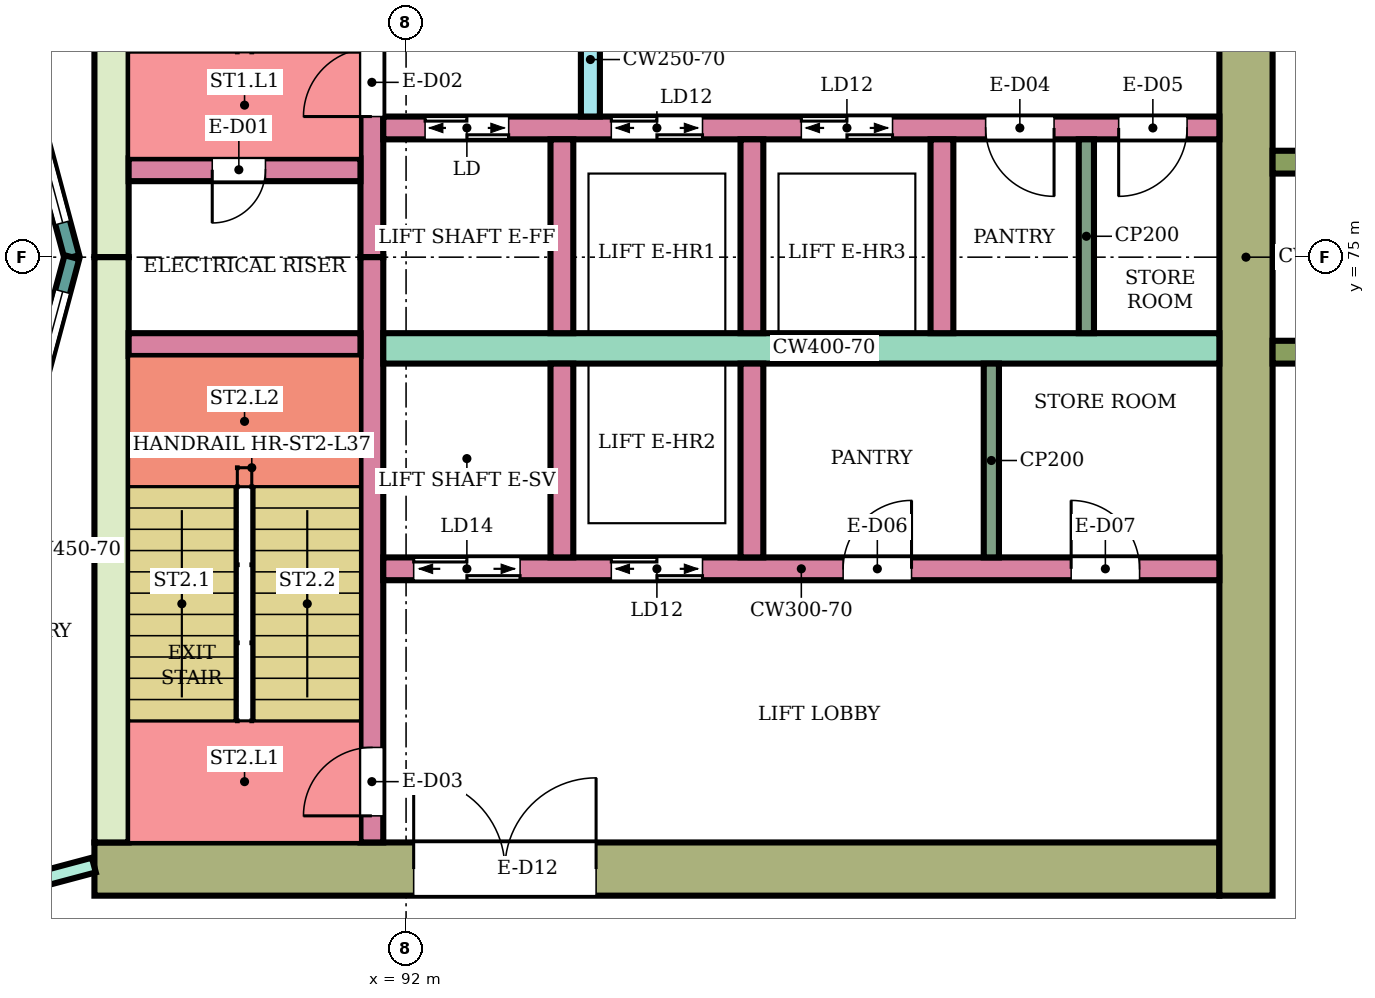
"""IFC4 building model, lengths in metres.
Left out: names, types, materials, properties, quantities, classifications, styles, units other than length and angle.
Written with IfcOpenShell. Run it as: python <this file> out.ifc"""

import sys

from ifc_helpers import new_model, si_unit, direction, frame, frame_2d, origin, place, context, subcontext, project, spatial, rectangle, extrude, element, fill, save


model = new_model("IFC4")
c1 = context("Model", 3, precision=1e-05, world=origin(), true_north=direction((0.0, 1.0)))
c2 = subcontext(c1, "Body", "Model", "MODEL_VIEW")
j1 = project(units=[si_unit("LENGTHUNIT", "METRE"), si_unit("PLANEANGLEUNIT", "RADIAN")], contexts=[c1])
p1 = place(None, origin())
s1 = spatial("IfcSite", under=j1, at=p1, CompositionType="ELEMENT")
p2 = place(p1, origin())
s2 = spatial("IfcBuilding", under=s1, at=p2, CompositionType="ELEMENT")
p3 = place(p2, frame((0.0, 0.0, 161.8)))
s3 = spatial("IfcBuildingStorey", under=s2, at=p3, CompositionType="ELEMENT", Elevation=161.8)
p4 = place(p3, frame((87.9, 66.95, 0.0), z_axis=(0.0, 0.0, 1.0), x_axis=(1.0, 0.0, 0.0)))
e1 = element("IfcWall", 1, at=p4, inside=s3, PredefinedType="SHEAR", context=c2, shape_type="SweptSolid", body=[
    extrude(rectangle(XDim=14.8, YDim=0.7, at=frame_2d((7.4, 0.0))), origin(), (0.0, 0.0, 1.0), 3.78),
])
p5 = place(p4, frame((4.2, 0.0, 0.0)))
e2 = element("IfcOpeningElement", 2, at=p5, cuts=e1, PredefinedType="OPENING", context=c2, shape_type="SweptSolid", body=[
    extrude(rectangle(XDim=2.4, YDim=2.4, at=frame_2d((1.2, 1.2))), frame((0.0, 0.36, 0.0), z_axis=(0.0, -1.0, 0.0), x_axis=(1.0, 0.0, 0.0)), (0.0, 0.0, 1.0), 0.72),
])
for number, where, z_axis, x_axis in (
    (3, (88.125, 75.0, 0.0), (0.0, 0.0, 1.0), (0.0, 1.0, 0.0)),
    (4, (88.125, 67.3, 0.0), (0.0, 0.0, 1.0), (0.0, 1.0, 0.0)),
):
    element("IfcWall", number, at=place(p3, frame(where, z_axis=z_axis, x_axis=x_axis)), inside=s3, PredefinedType="SHEAR", context=c2, shape_type="SweptSolid", body=[
        extrude(rectangle(XDim=7.7, YDim=0.45, at=frame_2d((3.85, 0.0))), origin(), (0.0, 0.0, 1.0), 3.78),
    ])
p6 = place(p3, frame((103.05, 66.6, 0.0), z_axis=(0.0, 0.0, 1.0), x_axis=(0.0, 1.0, 0.0)))
e5 = element("IfcWall", 5, at=p6, inside=s3, PredefinedType="SHEAR", context=c2, shape_type="SweptSolid", body=[
    extrude(rectangle(XDim=16.8, YDim=0.7, at=frame_2d((8.4, 0.0))), origin(), (0.0, 0.0, 1.0), 3.78),
])
p7 = place(p3, frame((91.55, 75.0, 0.0), z_axis=(0.0, 0.0, 1.0), x_axis=(0.0, 1.0, 0.0)))
e6 = element("IfcWall", 6, at=p7, inside=s3, PredefinedType="SHEAR", context=c2, shape_type="SweptSolid", body=[
    extrude(rectangle(XDim=7.7, YDim=0.3, at=frame_2d((3.85, 0.0))), origin(), (0.0, 0.0, 1.0), 3.78),
])
p8 = place(p7, frame((1.85, 0.0, 0.0)))
e7 = element("IfcOpeningElement", 7, at=p8, cuts=e6, PredefinedType="OPENING", context=c2, shape_type="SweptSolid", body=[
    extrude(rectangle(XDim=0.9, YDim=2.1, at=frame_2d((0.45, 1.05))), frame((0.0, 0.16, 0.0), z_axis=(0.0, -1.0, 0.0), x_axis=(1.0, 0.0, 0.0)), (0.0, 0.0, 1.0), 0.32),
])
p9 = place(p3, frame((91.55, 67.3, 0.0), z_axis=(0.0, 0.0, 1.0), x_axis=(0.0, 1.0, 0.0)))
e8 = element("IfcWall", 8, at=p9, inside=s3, PredefinedType="SHEAR", context=c2, shape_type="SweptSolid", body=[
    extrude(rectangle(XDim=7.7, YDim=0.3, at=frame_2d((3.85, 0.0))), origin(), (0.0, 0.0, 1.0), 3.78),
])
p10 = place(p9, frame((0.35, 0.0, 0.0)))
e9 = element("IfcOpeningElement", 9, at=p10, cuts=e8, PredefinedType="OPENING", context=c2, shape_type="SweptSolid", body=[
    extrude(rectangle(XDim=0.9, YDim=2.1, at=frame_2d((0.45, 1.05))), frame((0.0, 0.16, 0.0), z_axis=(0.0, -1.0, 0.0), x_axis=(1.0, 0.0, 0.0)), (0.0, 0.0, 1.0), 0.32),
])
p11 = place(p3, frame((88.35, 76.15, 0.0), z_axis=(0.0, 0.0, 1.0), x_axis=(1.0, 0.0, 0.0)))
e10 = element("IfcWall", 10, at=p11, inside=s3, PredefinedType="SHEAR", context=c2, shape_type="SweptSolid", body=[
    extrude(rectangle(XDim=3.05, YDim=0.3, at=frame_2d((1.525, 0.0))), origin(), (0.0, 0.0, 1.0), 3.78),
])
p12 = place(p11, frame((1.1, 0.0, 0.0)))
e11 = element("IfcOpeningElement", 11, at=p12, cuts=e10, PredefinedType="OPENING", context=c2, shape_type="SweptSolid", body=[
    extrude(rectangle(XDim=0.7, YDim=2.0, at=frame_2d((0.35, 1.0))), frame((0.0, 0.16, 0.0), z_axis=(0.0, -1.0, 0.0), x_axis=(1.0, 0.0, 0.0)), (0.0, 0.0, 1.0), 0.32),
])
p13 = place(p3, frame((88.35, 73.85, 0.0), z_axis=(0.0, 0.0, 1.0), x_axis=(1.0, 0.0, 0.0)))
e12 = element("IfcWall", 12, at=p13, inside=s3, PredefinedType="SHEAR", context=c2, shape_type="SweptSolid", body=[
    extrude(rectangle(XDim=3.05, YDim=0.3, at=frame_2d((1.525, 0.0))), origin(), (0.0, 0.0, 1.0), 3.78),
])
p14 = place(p3, frame((91.7, 76.7, 0.0), z_axis=(0.0, 0.0, 1.0), x_axis=(1.0, 0.0, 0.0)))
e13 = element("IfcWall", 13, at=p14, inside=s3, PredefinedType="SHEAR", context=c2, shape_type="SweptSolid", body=[
    extrude(rectangle(XDim=11.0, YDim=0.3, at=frame_2d((5.5, 0.0))), origin(), (0.0, 0.0, 1.0), 3.78),
])
p15 = place(p14, frame((0.55, 0.0, 0.0)))
e14 = element("IfcOpeningElement", 14, at=p15, cuts=e13, PredefinedType="OPENING", context=c2, shape_type="SweptSolid", body=[
    extrude(rectangle(XDim=1.1, YDim=2.1, at=frame_2d((0.55, 1.05))), frame((0.0, 0.16, 0.0), z_axis=(0.0, -1.0, 0.0), x_axis=(1.0, 0.0, 0.0)), (0.0, 0.0, 1.0), 0.32),
])
p16 = place(p14, frame((3.0, 0.0, 0.0)))
e15 = element("IfcOpeningElement", 15, at=p16, cuts=e13, PredefinedType="OPENING", context=c2, shape_type="SweptSolid", body=[
    extrude(rectangle(XDim=1.2, YDim=2.1, at=frame_2d((0.6, 1.05))), frame((0.0, 0.16, 0.0), z_axis=(0.0, -1.0, 0.0), x_axis=(1.0, 0.0, 0.0)), (0.0, 0.0, 1.0), 0.32),
])
p17 = place(p14, frame((5.5, 0.0, 0.0)))
e16 = element("IfcOpeningElement", 16, at=p17, cuts=e13, PredefinedType="OPENING", context=c2, shape_type="SweptSolid", body=[
    extrude(rectangle(XDim=1.2, YDim=2.1, at=frame_2d((0.6, 1.05))), frame((0.0, 0.16, 0.0), z_axis=(0.0, -1.0, 0.0), x_axis=(1.0, 0.0, 0.0)), (0.0, 0.0, 1.0), 0.32),
])
p18 = place(p14, frame((7.925, 0.0, 0.0)))
e17 = element("IfcOpeningElement", 17, at=p18, cuts=e13, PredefinedType="OPENING", context=c2, shape_type="SweptSolid", body=[
    extrude(rectangle(XDim=0.9, YDim=2.1, at=frame_2d((0.45, 1.05))), frame((0.0, 0.16, 0.0), z_axis=(0.0, -1.0, 0.0), x_axis=(1.0, 0.0, 0.0)), (0.0, 0.0, 1.0), 0.32),
])
p19 = place(p14, frame((9.675, 0.0, 0.0)))
e18 = element("IfcOpeningElement", 18, at=p19, cuts=e13, PredefinedType="OPENING", context=c2, shape_type="SweptSolid", body=[
    extrude(rectangle(XDim=0.9, YDim=2.1, at=frame_2d((0.45, 1.05))), frame((0.0, 0.16, 0.0), z_axis=(0.0, -1.0, 0.0), x_axis=(1.0, 0.0, 0.0)), (0.0, 0.0, 1.0), 0.32),
])
p20 = place(p3, frame((91.7, 73.8, 0.0), z_axis=(0.0, 0.0, 1.0), x_axis=(1.0, 0.0, 0.0)))
e19 = element("IfcWall", 19, at=p20, inside=s3, PredefinedType="SHEAR", context=c2, shape_type="SweptSolid", body=[
    extrude(rectangle(XDim=11.0, YDim=0.4, at=frame_2d((5.5, 0.0))), origin(), (0.0, 0.0, 1.0), 3.78),
])
p21 = place(p3, frame((91.7, 70.9, 0.0), z_axis=(0.0, 0.0, 1.0), x_axis=(1.0, 0.0, 0.0)))
e20 = element("IfcWall", 20, at=p21, inside=s3, PredefinedType="SHEAR", context=c2, shape_type="SweptSolid", body=[
    extrude(rectangle(XDim=11.0, YDim=0.3, at=frame_2d((5.5, 0.0))), origin(), (0.0, 0.0, 1.0), 3.78),
])
p22 = place(p21, frame((0.4, 0.0, 0.0)))
e21 = element("IfcOpeningElement", 21, at=p22, cuts=e20, PredefinedType="OPENING", context=c2, shape_type="SweptSolid", body=[
    extrude(rectangle(XDim=1.4, YDim=2.1, at=frame_2d((0.7, 1.05))), frame((0.0, 0.16, 0.0), z_axis=(0.0, -1.0, 0.0), x_axis=(1.0, 0.0, 0.0)), (0.0, 0.0, 1.0), 0.32),
])
p23 = place(p21, frame((3.0, 0.0, 0.0)))
e22 = element("IfcOpeningElement", 22, at=p23, cuts=e20, PredefinedType="OPENING", context=c2, shape_type="SweptSolid", body=[
    extrude(rectangle(XDim=1.2, YDim=2.1, at=frame_2d((0.6, 1.05))), frame((0.0, 0.16, 0.0), z_axis=(0.0, -1.0, 0.0), x_axis=(1.0, 0.0, 0.0)), (0.0, 0.0, 1.0), 0.32),
])
p24 = place(p21, frame((6.05, 0.0, 0.0)))
e23 = element("IfcOpeningElement", 23, at=p24, cuts=e20, PredefinedType="OPENING", context=c2, shape_type="SweptSolid", body=[
    extrude(rectangle(XDim=0.9, YDim=2.1, at=frame_2d((0.45, 1.05))), frame((0.0, 0.16, 0.0), z_axis=(0.0, -1.0, 0.0), x_axis=(1.0, 0.0, 0.0)), (0.0, 0.0, 1.0), 0.32),
])
p25 = place(p21, frame((9.05, 0.0, 0.0)))
e24 = element("IfcOpeningElement", 24, at=p25, cuts=e20, PredefinedType="OPENING", context=c2, shape_type="SweptSolid", body=[
    extrude(rectangle(XDim=0.9, YDim=2.1, at=frame_2d((0.45, 1.05))), frame((0.0, 0.16, 0.0), z_axis=(0.0, -1.0, 0.0), x_axis=(1.0, 0.0, 0.0)), (0.0, 0.0, 1.0), 0.32),
])
for number, where, z_axis, x_axis in (
    (25, (94.05, 74.0, 0.0), (0.0, 0.0, 1.0), (0.0, 1.0, 0.0)),
    (26, (96.55, 74.0, 0.0), (0.0, 0.0, 1.0), (0.0, 1.0, 0.0)),
    (27, (99.05, 74.0, 0.0), (0.0, 0.0, 1.0), (0.0, 1.0, 0.0)),
    (28, (94.05, 71.05, 0.0), (0.0, 0.0, 1.0), (0.0, 1.0, 0.0)),
    (29, (96.55, 71.05, 0.0), (0.0, 0.0, 1.0), (0.0, 1.0, 0.0)),
):
    element("IfcWall", number, at=place(p3, frame(where, z_axis=z_axis, x_axis=x_axis)), inside=s3, PredefinedType="SHEAR", context=c2, shape_type="SweptSolid", body=[
        extrude(rectangle(XDim=2.55, YDim=0.3, at=frame_2d((1.275, 0.0))), origin(), (0.0, 0.0, 1.0), 3.78),
    ])
p26 = place(p3, frame((94.425, 76.85, 0.0), z_axis=(0.0, 0.0, 1.0), x_axis=(0.0, 1.0, 0.0)))
e30 = element("IfcWall", 30, at=p26, inside=s3, PredefinedType="SHEAR", context=c2, shape_type="SweptSolid", body=[
    extrude(rectangle(XDim=1.5, YDim=0.25, at=frame_2d((0.75, 0.0))), origin(), (0.0, 0.0, 1.0), 3.78),
])
for number, where, z_axis, x_axis in (
    (31, (103.4, 73.75, 0.0), (0.0, 0.0, 1.0), (1.0, 0.0, 0.0)),
    (32, (103.4, 76.25, 0.0), (0.0, 0.0, 1.0), (1.0, 0.0, 0.0)),
):
    element("IfcWall", number, at=place(p3, frame(where, z_axis=z_axis, x_axis=x_axis)), inside=s3, PredefinedType="NOTDEFINED", context=c2, shape_type="SweptSolid", body=[
        extrude(rectangle(XDim=2.416, YDim=0.3, at=frame_2d((1.208, 0.0))), origin(), (0.0, 0.0, 1.0), 4.1),
    ])
p27 = place(p3, frame((87.604, 75.0, 0.0), z_axis=(0.0, 0.0, 1.0), x_axis=(-0.258789828301, 0.965933654434, 0.0)))
e33 = element("IfcWall", 33, at=p27, inside=s3, PredefinedType="NOTDEFINED", context=c2, shape_type="SweptSolid", body=[
    extrude(rectangle(XDim=3.936, YDim=0.2, at=frame_2d((1.968, 0.0))), origin(), (0.0, 0.0, 1.0), 4.1),
])
p28 = place(p27, frame((0.468, 0.0, 0.9)))
e34 = element("IfcOpeningElement", 34, at=p28, cuts=e33, PredefinedType="OPENING", context=c2, shape_type="SweptSolid", body=[
    extrude(rectangle(XDim=3.0, YDim=2.3, at=frame_2d((1.5, 1.15))), frame((0.0, 0.11, 0.0), z_axis=(0.0, -1.0, 0.0), x_axis=(1.0, 0.0, 0.0)), (0.0, 0.0, 1.0), 0.22),
])
p29 = place(p3, frame((86.585, 71.198, 0.0), z_axis=(0.0, 0.0, 1.0), x_axis=(0.258789828301, 0.965933654434, 0.0)))
e35 = element("IfcWall", 35, at=p29, inside=s3, PredefinedType="NOTDEFINED", context=c2, shape_type="SweptSolid", body=[
    extrude(rectangle(XDim=3.936, YDim=0.2, at=frame_2d((1.968, 0.0))), origin(), (0.0, 0.0, 1.0), 4.1),
])
p30 = place(p29, frame((0.468, 0.0, 0.9)))
e36 = element("IfcOpeningElement", 36, at=p30, cuts=e35, PredefinedType="OPENING", context=c2, shape_type="SweptSolid", body=[
    extrude(rectangle(XDim=3.0, YDim=2.3, at=frame_2d((1.5, 1.15))), frame((0.0, 0.11, 0.0), z_axis=(0.0, -1.0, 0.0), x_axis=(1.0, 0.0, 0.0)), (0.0, 0.0, 1.0), 0.22),
])
p31 = place(p3, frame((80.125, 64.932, 0.0), z_axis=(0.0, 0.0, 1.0), x_axis=(0.966236955806, 0.257655089674, 0.0)))
e37 = element("IfcWall", 37, at=p31, inside=s3, PredefinedType="PARTITIONING", context=c2, shape_type="SweptSolid", body=[
    extrude(rectangle(XDim=8.039, YDim=0.2, at=frame_2d((4.02, 0.0))), origin(), (0.0, 0.0, 1.0), 3.65),
])
p32 = place(p31, frame((6.298, 0.0, 0.0)))
e38 = element("IfcOpeningElement", 38, at=p32, cuts=e37, PredefinedType="OPENING", context=c2, shape_type="SweptSolid", body=[
    extrude(rectangle(XDim=0.9, YDim=2.1, at=frame_2d((0.45, 1.05))), frame((0.0, 0.11, 0.0), z_axis=(0.0, -1.0, 0.0), x_axis=(1.0, 0.0, 0.0)), (0.0, 0.0, 1.0), 0.22),
])
p33 = place(p31, frame((2.045, 0.0, 0.0)))
e39 = element("IfcOpeningElement", 39, at=p33, cuts=e37, PredefinedType="OPENING", context=c2, shape_type="SweptSolid", body=[
    extrude(rectangle(XDim=0.9, YDim=2.1, at=frame_2d((0.45, 1.05))), frame((0.0, 0.11, 0.0), z_axis=(0.0, -1.0, 0.0), x_axis=(1.0, 0.0, 0.0)), (0.0, 0.0, 1.0), 0.22),
])
for number, where, z_axis, x_axis in (
    (40, (100.95, 74.0, 0.0), (0.0, 0.0, 1.0), (0.0, 1.0, 0.0)),
    (41, (99.7, 71.05, 0.0), (0.0, 0.0, 1.0), (0.0, 1.0, 0.0)),
):
    element("IfcWall", number, at=place(p3, frame(where, z_axis=z_axis, x_axis=x_axis)), inside=s3, PredefinedType="PARTITIONING", context=c2, shape_type="SweptSolid", body=[
        extrude(rectangle(XDim=2.55, YDim=0.2, at=frame_2d((1.275, 0.0))), origin(), (0.0, 0.0, 1.0), 3.78),
    ])
p34 = place(p28, origin())
e42 = element("IfcWindow", 42, at=p34, inside=s3, PartitioningType="SINGLE_PANEL", PredefinedType="WINDOW", context=c2, shape_type="SweptSolid", body=[
    extrude(rectangle(XDim=3.0, YDim=2.3, at=frame_2d((1.5, 1.15))), frame((0.0, 0.03, 0.0), z_axis=(0.0, -1.0, 0.0), x_axis=(1.0, 0.0, 0.0)), (0.0, 0.0, 1.0), 0.06),
])
fill(e34, e42)
p35 = place(p30, origin())
e43 = element("IfcWindow", 43, at=p35, inside=s3, PartitioningType="SINGLE_PANEL", PredefinedType="WINDOW", context=c2, shape_type="SweptSolid", body=[
    extrude(rectangle(XDim=3.0, YDim=2.3, at=frame_2d((1.5, 1.15))), frame((0.0, 0.03, 0.0), z_axis=(0.0, -1.0, 0.0), x_axis=(1.0, 0.0, 0.0)), (0.0, 0.0, 1.0), 0.06),
])
fill(e36, e43)
p36 = place(p12, frame((0.7, 0.0, 0.0), z_axis=(0.0, 0.0, 1.0), x_axis=(-1.0, 0.0, 0.0)))
e44 = element("IfcDoor", 44, at=p36, inside=s3, OperationType="SINGLE_SWING_RIGHT", PredefinedType="DOOR", context=c2, shape_type="SweptSolid", body=[
    extrude(rectangle(XDim=0.7, YDim=2.0, at=frame_2d((0.35, 1.0))), frame((0.0, 0.025, 0.0), z_axis=(0.0, -1.0, 0.0), x_axis=(1.0, 0.0, 0.0)), (0.0, 0.0, 1.0), 0.05),
])
fill(e11, e44)
p37 = place(p8, origin())
e45 = element("IfcDoor", 45, at=p37, inside=s3, OperationType="SINGLE_SWING_LEFT", PredefinedType="DOOR", context=c2, shape_type="SweptSolid", body=[
    extrude(rectangle(XDim=0.9, YDim=2.1, at=frame_2d((0.45, 1.05))), frame((0.0, 0.025, 0.0), z_axis=(0.0, -1.0, 0.0), x_axis=(1.0, 0.0, 0.0)), (0.0, 0.0, 1.0), 0.05),
])
fill(e7, e45)
p38 = place(p10, origin())
e46 = element("IfcDoor", 46, at=p38, inside=s3, OperationType="SINGLE_SWING_LEFT", PredefinedType="DOOR", context=c2, shape_type="SweptSolid", body=[
    extrude(rectangle(XDim=0.9, YDim=2.1, at=frame_2d((0.45, 1.05))), frame((0.0, 0.025, 0.0), z_axis=(0.0, -1.0, 0.0), x_axis=(1.0, 0.0, 0.0)), (0.0, 0.0, 1.0), 0.05),
])
fill(e9, e46)
p39 = place(p15, origin())
e47 = element("IfcDoor", 47, at=p39, inside=s3, OperationType="DOUBLE_DOOR_SLIDING", PredefinedType="DOOR", context=c2, shape_type="SweptSolid", body=[
    extrude(rectangle(XDim=1.1, YDim=2.1, at=frame_2d((0.55, 1.05))), frame((0.0, 0.025, 0.0), z_axis=(0.0, -1.0, 0.0), x_axis=(1.0, 0.0, 0.0)), (0.0, 0.0, 1.0), 0.05),
])
fill(e14, e47)
p40 = place(p16, origin())
e48 = element("IfcDoor", 48, at=p40, inside=s3, OperationType="DOUBLE_DOOR_SLIDING", PredefinedType="DOOR", context=c2, shape_type="SweptSolid", body=[
    extrude(rectangle(XDim=1.2, YDim=2.1, at=frame_2d((0.6, 1.05))), frame((0.0, 0.025, 0.0), z_axis=(0.0, -1.0, 0.0), x_axis=(1.0, 0.0, 0.0)), (0.0, 0.0, 1.0), 0.05),
])
fill(e15, e48)
p41 = place(p17, origin())
e49 = element("IfcDoor", 49, at=p41, inside=s3, OperationType="DOUBLE_DOOR_SLIDING", PredefinedType="DOOR", context=c2, shape_type="SweptSolid", body=[
    extrude(rectangle(XDim=1.2, YDim=2.1, at=frame_2d((0.6, 1.05))), frame((0.0, 0.025, 0.0), z_axis=(0.0, -1.0, 0.0), x_axis=(1.0, 0.0, 0.0)), (0.0, 0.0, 1.0), 0.05),
])
fill(e16, e49)
p42 = place(p18, frame((0.9, 0.0, 0.0), z_axis=(0.0, 0.0, 1.0), x_axis=(-1.0, 0.0, 0.0)))
e50 = element("IfcDoor", 50, at=p42, inside=s3, OperationType="SINGLE_SWING_LEFT", PredefinedType="DOOR", context=c2, shape_type="SweptSolid", body=[
    extrude(rectangle(XDim=0.9, YDim=2.1, at=frame_2d((0.45, 1.05))), frame((0.0, 0.025, 0.0), z_axis=(0.0, -1.0, 0.0), x_axis=(1.0, 0.0, 0.0)), (0.0, 0.0, 1.0), 0.05),
])
fill(e17, e50)
p43 = place(p19, frame((0.9, 0.0, 0.0), z_axis=(0.0, 0.0, 1.0), x_axis=(-1.0, 0.0, 0.0)))
e51 = element("IfcDoor", 51, at=p43, inside=s3, OperationType="SINGLE_SWING_RIGHT", PredefinedType="DOOR", context=c2, shape_type="SweptSolid", body=[
    extrude(rectangle(XDim=0.9, YDim=2.1, at=frame_2d((0.45, 1.05))), frame((0.0, 0.025, 0.0), z_axis=(0.0, -1.0, 0.0), x_axis=(1.0, 0.0, 0.0)), (0.0, 0.0, 1.0), 0.05),
])
fill(e18, e51)
p44 = place(p22, origin())
e52 = element("IfcDoor", 52, at=p44, inside=s3, OperationType="DOUBLE_DOOR_SLIDING", PredefinedType="DOOR", context=c2, shape_type="SweptSolid", body=[
    extrude(rectangle(XDim=1.4, YDim=2.1, at=frame_2d((0.7, 1.05))), frame((0.0, 0.025, 0.0), z_axis=(0.0, -1.0, 0.0), x_axis=(1.0, 0.0, 0.0)), (0.0, 0.0, 1.0), 0.05),
])
fill(e21, e52)
p45 = place(p23, origin())
e53 = element("IfcDoor", 53, at=p45, inside=s3, OperationType="DOUBLE_DOOR_SLIDING", PredefinedType="DOOR", context=c2, shape_type="SweptSolid", body=[
    extrude(rectangle(XDim=1.2, YDim=2.1, at=frame_2d((0.6, 1.05))), frame((0.0, 0.025, 0.0), z_axis=(0.0, -1.0, 0.0), x_axis=(1.0, 0.0, 0.0)), (0.0, 0.0, 1.0), 0.05),
])
fill(e22, e53)
p46 = place(p24, origin())
e54 = element("IfcDoor", 54, at=p46, inside=s3, OperationType="SINGLE_SWING_RIGHT", PredefinedType="DOOR", context=c2, shape_type="SweptSolid", body=[
    extrude(rectangle(XDim=0.9, YDim=2.1, at=frame_2d((0.45, 1.05))), frame((0.0, 0.025, 0.0), z_axis=(0.0, -1.0, 0.0), x_axis=(1.0, 0.0, 0.0)), (0.0, 0.0, 1.0), 0.05),
])
fill(e23, e54)
p47 = place(p25, origin())
e55 = element("IfcDoor", 55, at=p47, inside=s3, OperationType="SINGLE_SWING_LEFT", PredefinedType="DOOR", context=c2, shape_type="SweptSolid", body=[
    extrude(rectangle(XDim=0.9, YDim=2.1, at=frame_2d((0.45, 1.05))), frame((0.0, 0.025, 0.0), z_axis=(0.0, -1.0, 0.0), x_axis=(1.0, 0.0, 0.0)), (0.0, 0.0, 1.0), 0.05),
])
fill(e24, e55)
p48 = place(p5, origin())
e56 = element("IfcDoor", 56, at=p48, inside=s3, OperationType="DOUBLE_DOOR_SINGLE_SWING", PredefinedType="DOOR", context=c2, shape_type="SweptSolid", body=[
    extrude(rectangle(XDim=2.4, YDim=2.4, at=frame_2d((1.2, 1.2))), frame((0.0, 0.025, 0.0), z_axis=(0.0, -1.0, 0.0), x_axis=(1.0, 0.0, 0.0)), (0.0, 0.0, 1.0), 0.05),
])
fill(e2, e56)
save(model, sys.argv[1])
